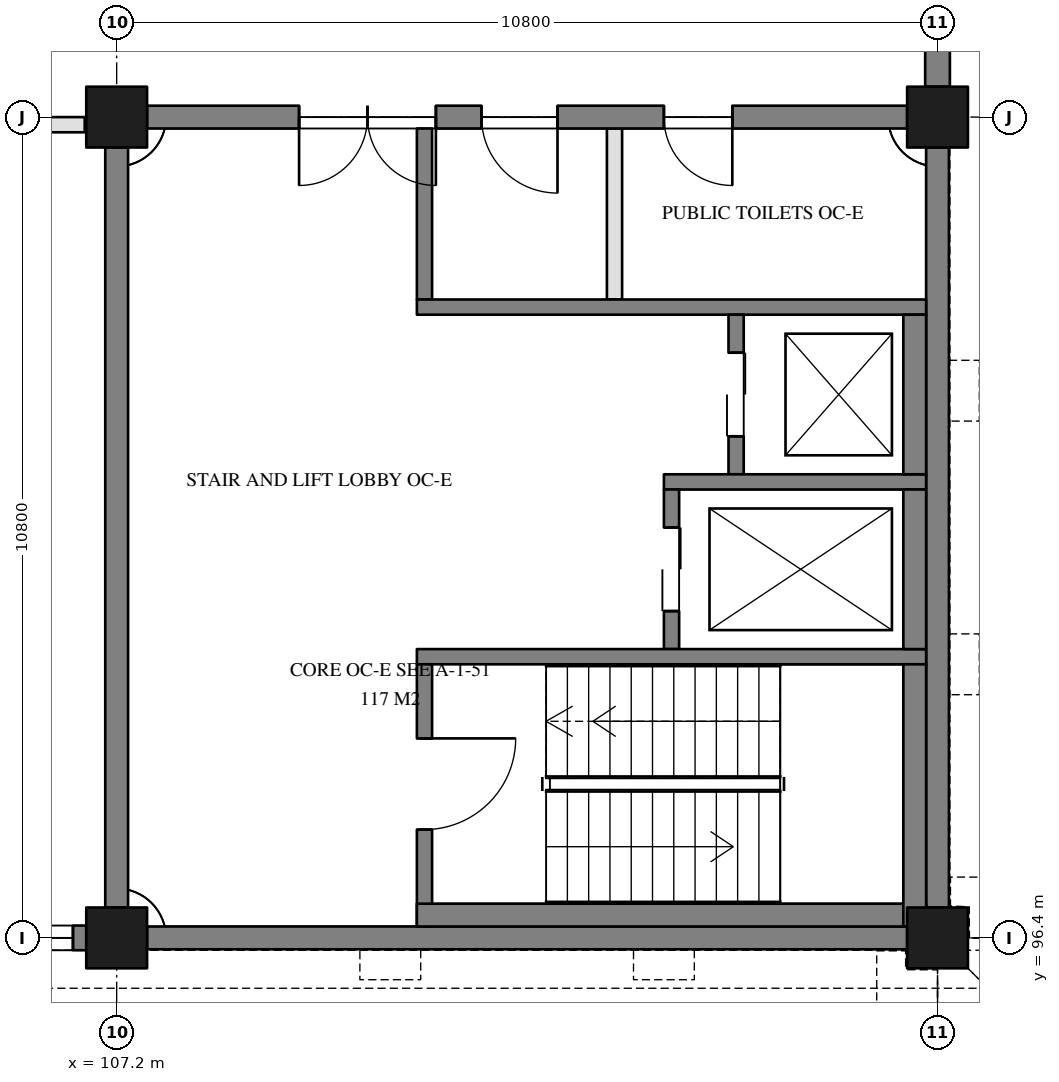
"""IFC4 building model, lengths in metres.
Left out: names, types, materials, properties, quantities, classifications, styles, units other than length and angle.
Written with IfcOpenShell. Run it as: python <this file> out.ifc"""

import sys

from ifc_helpers import new_model, si_unit, direction, frame, frame_2d, origin, origin_2d, place, context, subcontext, project, spatial, rectangle, extrude, element, fill, save


model = new_model("IFC4")
c1 = context("Model", 3, precision=1e-05, world=origin(), true_north=direction((0.0, 1.0)))
c2 = subcontext(c1, "Body", "Model", "MODEL_VIEW")
j1 = project(units=[si_unit("LENGTHUNIT", "METRE"), si_unit("PLANEANGLEUNIT", "RADIAN")], contexts=[c1])
p1 = place(None, origin())
s1 = spatial("IfcSite", under=j1, at=p1, CompositionType="ELEMENT")
p2 = place(p1, origin())
s2 = spatial("IfcBuilding", under=s1, at=p2, CompositionType="ELEMENT")
p3 = place(p2, frame((0.0, 0.0, 8.7)))
s3 = spatial("IfcBuildingStorey", under=s2, at=p3, CompositionType="ELEMENT", Elevation=8.7)
for number, where, z_axis, x_axis in (
    (1, (107.2, 96.4, 0.0), (0.0, 0.0, 1.0), (1.0, 0.0, 0.0)),
    (2, (107.2, 107.2, 0.0), (0.0, 0.0, 1.0), (1.0, 0.0, 0.0)),
    (3, (118.0, 96.4, 0.0), (0.0, 0.0, 1.0), (1.0, 0.0, 0.0)),
    (4, (118.0, 107.2, 0.0), (0.0, 0.0, 1.0), (1.0, 0.0, 0.0)),
):
    element("IfcColumn", number, at=place(p3, frame(where, z_axis=z_axis, x_axis=x_axis)), inside=s3, PredefinedType="COLUMN", context=c2, shape_type="SweptSolid", body=[
        extrude(rectangle(XDim=0.8, YDim=0.8, at=origin_2d()), origin(), (0.0, 0.0, 1.0), 3.9),
    ])
for number, where, z_axis, x_axis in (
    (5, (107.6, 96.4, 0.0), (0.0, 0.0, 1.0), (1.0, 0.0, 0.0)),
    (6, (118.0, 96.8, 0.0), (0.0, 0.0, 1.0), (0.0, 1.0, 0.0)),
):
    element("IfcWall", number, at=place(p3, frame(where, z_axis=z_axis, x_axis=x_axis)), inside=s3, PredefinedType="SOLIDWALL", context=c2, shape_type="SweptSolid", body=[
        extrude(rectangle(XDim=10.0, YDim=0.3, at=frame_2d((5.0, 0.0))), origin(), (0.0, 0.0, 1.0), 3.9),
    ])
p4 = place(p3, frame((117.6, 107.2, 0.0), z_axis=(0.0, 0.0, 1.0), x_axis=(-1.0, 0.0, 0.0)))
e7 = element("IfcWall", 7, at=p4, inside=s3, PredefinedType="SOLIDWALL", context=c2, shape_type="SweptSolid", body=[
    extrude(rectangle(XDim=10.0, YDim=0.3, at=frame_2d((5.0, 0.0))), origin(), (0.0, 0.0, 1.0), 3.9),
])
p5 = place(p4, frame((6.2, 0.0, 0.0)))
e8 = element("IfcOpeningElement", 8, at=p5, cuts=e7, PredefinedType="OPENING", context=c2, shape_type="SweptSolid", body=[
    extrude(rectangle(XDim=1.8, YDim=2.1, at=frame_2d((0.9, 1.05))), frame((0.0, 0.16, 0.0), z_axis=(0.0, -1.0, 0.0), x_axis=(1.0, 0.0, 0.0)), (0.0, 0.0, 1.0), 0.32),
])
p6 = place(p4, frame((4.6, 0.0, 0.0)))
e9 = element("IfcOpeningElement", 9, at=p6, cuts=e7, PredefinedType="OPENING", context=c2, shape_type="SweptSolid", body=[
    extrude(rectangle(XDim=1.0, YDim=2.1, at=frame_2d((0.5, 1.05))), frame((0.0, 0.16, 0.0), z_axis=(0.0, -1.0, 0.0), x_axis=(1.0, 0.0, 0.0)), (0.0, 0.0, 1.0), 0.32),
])
p7 = place(p4, frame((2.3, 0.0, 0.0)))
e10 = element("IfcOpeningElement", 10, at=p7, cuts=e7, PredefinedType="OPENING", context=c2, shape_type="SweptSolid", body=[
    extrude(rectangle(XDim=0.9, YDim=2.1, at=frame_2d((0.45, 1.05))), frame((0.0, 0.16, 0.0), z_axis=(0.0, -1.0, 0.0), x_axis=(1.0, 0.0, 0.0)), (0.0, 0.0, 1.0), 0.32),
])
p8 = place(p3, frame((107.2, 106.8, 0.0), z_axis=(0.0, 0.0, 1.0), x_axis=(0.0, -1.0, 0.0)))
e11 = element("IfcWall", 11, at=p8, inside=s3, PredefinedType="SOLIDWALL", context=c2, shape_type="SweptSolid", body=[
    extrude(rectangle(XDim=10.0, YDim=0.3, at=frame_2d((5.0, 0.0))), origin(), (0.0, 0.0, 1.0), 3.9),
])
p9 = place(p3, frame((96.8, 96.4, 0.0), z_axis=(0.0, 0.0, 1.0), x_axis=(1.0, 0.0, 0.0)))
e12 = element("IfcWall", 12, at=p9, inside=s3, PredefinedType="SOLIDWALL", context=c2, shape_type="SweptSolid", body=[
    extrude(rectangle(XDim=10.0, YDim=0.325, at=frame_2d((5.0, 0.0))), origin(), (0.0, 0.0, 1.0), 2.8),
])
p10 = place(p9, frame((0.175, 0.0, 0.5)))
e13 = element("IfcOpeningElement", 13, at=p10, cuts=e12, PredefinedType="OPENING", context=c2, shape_type="SweptSolid", body=[
    extrude(rectangle(XDim=0.95, YDim=2.25, at=frame_2d((0.475, 1.125))), frame((0.0, 0.172, 0.0), z_axis=(0.0, -1.0, 0.0), x_axis=(1.0, 0.0, 0.0)), (0.0, 0.0, 1.0), 0.345),
])
p11 = place(p9, frame((3.775, 0.0, 0.5)))
e14 = element("IfcOpeningElement", 14, at=p11, cuts=e12, PredefinedType="OPENING", context=c2, shape_type="SweptSolid", body=[
    extrude(rectangle(XDim=0.95, YDim=2.25, at=frame_2d((0.475, 1.125))), frame((0.0, 0.172, 0.0), z_axis=(0.0, -1.0, 0.0), x_axis=(1.0, 0.0, 0.0)), (0.0, 0.0, 1.0), 0.345),
])
p12 = place(p9, frame((7.375, 0.0, 0.5)))
e15 = element("IfcOpeningElement", 15, at=p12, cuts=e12, PredefinedType="OPENING", context=c2, shape_type="SweptSolid", body=[
    extrude(rectangle(XDim=0.95, YDim=2.25, at=frame_2d((0.475, 1.125))), frame((0.0, 0.172, 0.0), z_axis=(0.0, -1.0, 0.0), x_axis=(1.0, 0.0, 0.0)), (0.0, 0.0, 1.0), 0.345),
])
p13 = place(p9, frame((1.675, 0.0, 0.5)))
e16 = element("IfcOpeningElement", 16, at=p13, cuts=e12, PredefinedType="OPENING", context=c2, shape_type="SweptSolid", body=[
    extrude(rectangle(XDim=0.95, YDim=2.25, at=frame_2d((0.475, 1.125))), frame((0.0, 0.172, 0.0), z_axis=(0.0, -1.0, 0.0), x_axis=(1.0, 0.0, 0.0)), (0.0, 0.0, 1.0), 0.345),
])
p14 = place(p9, frame((5.275, 0.0, 0.5)))
e17 = element("IfcOpeningElement", 17, at=p14, cuts=e12, PredefinedType="OPENING", context=c2, shape_type="SweptSolid", body=[
    extrude(rectangle(XDim=0.95, YDim=2.25, at=frame_2d((0.475, 1.125))), frame((0.0, 0.172, 0.0), z_axis=(0.0, -1.0, 0.0), x_axis=(1.0, 0.0, 0.0)), (0.0, 0.0, 1.0), 0.345),
])
p15 = place(p9, frame((8.875, 0.0, 0.5)))
e18 = element("IfcOpeningElement", 18, at=p15, cuts=e12, PredefinedType="OPENING", context=c2, shape_type="SweptSolid", body=[
    extrude(rectangle(XDim=0.95, YDim=2.25, at=frame_2d((0.475, 1.125))), frame((0.0, 0.172, 0.0), z_axis=(0.0, -1.0, 0.0), x_axis=(1.0, 0.0, 0.0)), (0.0, 0.0, 1.0), 0.345),
])
p16 = place(p3, frame((118.0, 107.6, 0.0), z_axis=(0.0, 0.0, 1.0), x_axis=(0.0, 1.0, 0.0)))
e19 = element("IfcWall", 19, at=p16, inside=s3, PredefinedType="SOLIDWALL", context=c2, shape_type="SweptSolid", body=[
    extrude(rectangle(XDim=3.8, YDim=0.325, at=frame_2d((1.9, 0.0))), origin(), (0.0, 0.0, 1.0), 2.8),
])
p17 = place(p16, frame((0.95, 0.0, 0.7)))
e20 = element("IfcOpeningElement", 20, at=p17, cuts=e19, PredefinedType="OPENING", context=c2, shape_type="SweptSolid", body=[
    extrude(rectangle(XDim=0.9, YDim=2.0, at=frame_2d((0.45, 1.0))), frame((0.0, 0.172, 0.0), z_axis=(0.0, -1.0, 0.0), x_axis=(1.0, 0.0, 0.0)), (0.0, 0.0, 1.0), 0.345),
])
p18 = place(p3, frame((111.25, 107.05, 0.0), z_axis=(0.0, 0.0, 1.0), x_axis=(0.0, -1.0, 0.0)))
e21 = element("IfcWall", 21, at=p18, inside=s3, PredefinedType="SOLIDWALL", context=c2, shape_type="SweptSolid", body=[
    extrude(rectangle(XDim=2.25, YDim=0.2, at=frame_2d((1.125, 0.0))), origin(), (0.0, 0.0, 1.0), 3.6),
])
p19 = place(p3, frame((111.15, 104.7, 0.0), z_axis=(0.0, 0.0, 1.0), x_axis=(1.0, 0.0, 0.0)))
e22 = element("IfcWall", 22, at=p19, inside=s3, PredefinedType="SOLIDWALL", context=c2, shape_type="SweptSolid", body=[
    extrude(rectangle(XDim=6.7, YDim=0.2, at=frame_2d((3.35, 0.0))), origin(), (0.0, 0.0, 1.0), 3.6),
])
p20 = place(p3, frame((115.35, 104.6, 0.0), z_axis=(0.0, 0.0, 1.0), x_axis=(0.0, -1.0, 0.0)))
e23 = element("IfcWall", 23, at=p20, inside=s3, PredefinedType="SOLIDWALL", context=c2, shape_type="SweptSolid", body=[
    extrude(rectangle(XDim=2.1, YDim=0.2, at=frame_2d((1.05, 0.0))), origin(), (0.0, 0.0, 1.0), 3.6),
])
p21 = place(p20, frame((0.5, 0.0, 0.0)))
e24 = element("IfcOpeningElement", 24, at=p21, cuts=e23, PredefinedType="OPENING", context=c2, shape_type="SweptSolid", body=[
    extrude(rectangle(XDim=1.1, YDim=2.1, at=frame_2d((0.55, 1.05))), frame((0.0, 0.11, 0.0), z_axis=(0.0, -1.0, 0.0), x_axis=(1.0, 0.0, 0.0)), (0.0, 0.0, 1.0), 0.22),
])
p22 = place(p3, frame((114.4, 102.4, 0.0), z_axis=(0.0, 0.0, 1.0), x_axis=(1.0, 0.0, 0.0)))
e25 = element("IfcWall", 25, at=p22, inside=s3, PredefinedType="SOLIDWALL", context=c2, shape_type="SweptSolid", body=[
    extrude(rectangle(XDim=3.45, YDim=0.2, at=frame_2d((1.725, 0.0))), origin(), (0.0, 0.0, 1.0), 3.6),
])
p23 = place(p3, frame((114.5, 102.3, 0.0), z_axis=(0.0, 0.0, 1.0), x_axis=(0.0, -1.0, 0.0)))
e26 = element("IfcWall", 26, at=p23, inside=s3, PredefinedType="SOLIDWALL", context=c2, shape_type="SweptSolid", body=[
    extrude(rectangle(XDim=2.1, YDim=0.2, at=frame_2d((1.05, 0.0))), origin(), (0.0, 0.0, 1.0), 3.6),
])
p24 = place(p23, frame((0.5, 0.0, 0.0)))
e27 = element("IfcOpeningElement", 27, at=p24, cuts=e26, PredefinedType="OPENING", context=c2, shape_type="SweptSolid", body=[
    extrude(rectangle(XDim=1.1, YDim=2.1, at=frame_2d((0.55, 1.05))), frame((0.0, 0.11, 0.0), z_axis=(0.0, -1.0, 0.0), x_axis=(1.0, 0.0, 0.0)), (0.0, 0.0, 1.0), 0.22),
])
p25 = place(p3, frame((111.15, 100.1, 0.0), z_axis=(0.0, 0.0, 1.0), x_axis=(1.0, 0.0, 0.0)))
e28 = element("IfcWall", 28, at=p25, inside=s3, PredefinedType="SOLIDWALL", context=c2, shape_type="SweptSolid", body=[
    extrude(rectangle(XDim=6.7, YDim=0.2, at=frame_2d((3.35, 0.0))), origin(), (0.0, 0.0, 1.0), 3.6),
])
p26 = place(p3, frame((111.25, 100.0, 0.0), z_axis=(0.0, 0.0, 1.0), x_axis=(0.0, -1.0, 0.0)))
e29 = element("IfcWall", 29, at=p26, inside=s3, PredefinedType="SOLIDWALL", context=c2, shape_type="SweptSolid", body=[
    extrude(rectangle(XDim=3.45, YDim=0.2, at=frame_2d((1.725, 0.0))), origin(), (0.0, 0.0, 1.0), 3.6),
])
p27 = place(p26, frame((0.975, 0.0, 0.0)))
e30 = element("IfcOpeningElement", 30, at=p27, cuts=e29, PredefinedType="OPENING", context=c2, shape_type="SweptSolid", body=[
    extrude(rectangle(XDim=1.2, YDim=2.1, at=frame_2d((0.6, 1.05))), frame((0.0, 0.11, 0.0), z_axis=(0.0, -1.0, 0.0), x_axis=(1.0, 0.0, 0.0)), (0.0, 0.0, 1.0), 0.22),
])
p28 = place(p3, frame((111.15, 96.7, -0.3), z_axis=(0.0, 0.0, 1.0), x_axis=(1.0, 0.0, 0.0)))
e31 = element("IfcWall", 31, at=p28, inside=s3, PredefinedType="SOLIDWALL", context=c2, shape_type="SweptSolid", body=[
    extrude(rectangle(XDim=6.7, YDim=0.3, at=frame_2d((3.35, 0.0))), origin(), (0.0, 0.0, 1.0), 3.9),
])
p29 = place(p3, frame((117.7, 100.0, -0.3), z_axis=(0.0, 0.0, 1.0), x_axis=(0.0, -1.0, 0.0)))
e32 = element("IfcWall", 32, at=p29, inside=s3, PredefinedType="SOLIDWALL", context=c2, shape_type="SweptSolid", body=[
    extrude(rectangle(XDim=3.45, YDim=0.3, at=frame_2d((1.725, 0.0))), origin(), (0.0, 0.0, 1.0), 3.9),
])
for number, where, z_axis, x_axis in (
    (33, (117.7, 104.6, -0.3), (0.0, 0.0, 1.0), (0.0, -1.0, 0.0)),
    (34, (117.7, 102.3, -0.3), (0.0, 0.0, 1.0), (0.0, -1.0, 0.0)),
):
    element("IfcWall", number, at=place(p3, frame(where, z_axis=z_axis, x_axis=x_axis)), inside=s3, PredefinedType="SOLIDWALL", context=c2, shape_type="SweptSolid", body=[
        extrude(rectangle(XDim=2.1, YDim=0.3, at=frame_2d((1.05, 0.0))), origin(), (0.0, 0.0, 1.0), 3.9),
    ])
p30 = place(p3, frame((113.75, 107.05, 0.0), z_axis=(0.0, 0.0, 1.0), x_axis=(0.0, -1.0, 0.0)))
e35 = element("IfcWall", 35, at=p30, inside=s3, PredefinedType="PARTITIONING", context=c2, shape_type="SweptSolid", body=[
    extrude(rectangle(XDim=2.25, YDim=0.2, at=frame_2d((1.125, 0.0))), origin(), (0.0, 0.0, 1.0), 3.6),
])
p31 = place(p3, frame((96.82, 107.1, 0.0), z_axis=(0.0, 0.0, 1.0), x_axis=(1.0, 0.0, 0.0)))
e36 = element("IfcWall", 36, at=p31, inside=s3, PredefinedType="PARTITIONING", context=c2, shape_type="SweptSolid", body=[
    extrude(rectangle(XDim=9.96, YDim=0.2, at=frame_2d((4.98, 0.0))), origin(), (0.0, 0.0, 1.0), 2.8),
])
p32 = place(p31, frame((4.08, 0.0, 0.0)))
e37 = element("IfcOpeningElement", 37, at=p32, cuts=e36, PredefinedType="OPENING", context=c2, shape_type="SweptSolid", body=[
    extrude(rectangle(XDim=1.8, YDim=2.1, at=frame_2d((0.9, 1.05))), frame((0.0, 0.11, 0.0), z_axis=(0.0, -1.0, 0.0), x_axis=(1.0, 0.0, 0.0)), (0.0, 0.0, 1.0), 0.22),
])
p33 = place(p15, origin())
e38 = element("IfcWindow", 38, at=p33, inside=s3, PartitioningType="SINGLE_PANEL", PredefinedType="WINDOW", context=c2, shape_type="SweptSolid", body=[
    extrude(rectangle(XDim=0.95, YDim=2.25, at=frame_2d((0.475, 1.125))), frame((0.0, 0.03, 0.0), z_axis=(0.0, -1.0, 0.0), x_axis=(1.0, 0.0, 0.0)), (0.0, 0.0, 1.0), 0.06),
])
fill(e18, e38)
p34 = place(p21, frame((1.1, 0.0, 0.0), z_axis=(0.0, 0.0, 1.0), x_axis=(-1.0, 0.0, 0.0)))
e39 = element("IfcDoor", 39, at=p34, inside=s3, OperationType="DOUBLE_DOOR_SLIDING", PredefinedType="DOOR", context=c2, shape_type="SweptSolid", body=[
    extrude(rectangle(XDim=1.1, YDim=2.1, at=frame_2d((0.55, 1.05))), frame((0.0, 0.025, 0.0), z_axis=(0.0, -1.0, 0.0), x_axis=(1.0, 0.0, 0.0)), (0.0, 0.0, 1.0), 0.05),
])
fill(e24, e39)
p35 = place(p24, frame((1.1, 0.0, 0.0), z_axis=(0.0, 0.0, 1.0), x_axis=(-1.0, 0.0, 0.0)))
e40 = element("IfcDoor", 40, at=p35, inside=s3, OperationType="DOUBLE_DOOR_SLIDING", PredefinedType="DOOR", context=c2, shape_type="SweptSolid", body=[
    extrude(rectangle(XDim=1.1, YDim=2.1, at=frame_2d((0.55, 1.05))), frame((0.0, 0.025, 0.0), z_axis=(0.0, -1.0, 0.0), x_axis=(1.0, 0.0, 0.0)), (0.0, 0.0, 1.0), 0.05),
])
fill(e27, e40)
p36 = place(p27, frame((1.2, 0.0, 0.0), z_axis=(0.0, 0.0, 1.0), x_axis=(-1.0, 0.0, 0.0)))
e41 = element("IfcDoor", 41, at=p36, inside=s3, OperationType="SINGLE_SWING_RIGHT", PredefinedType="DOOR", context=c2, shape_type="SweptSolid", body=[
    extrude(rectangle(XDim=1.2, YDim=2.1, at=frame_2d((0.6, 1.05))), frame((0.0, 0.025, 0.0), z_axis=(0.0, -1.0, 0.0), x_axis=(1.0, 0.0, 0.0)), (0.0, 0.0, 1.0), 0.05),
])
fill(e30, e41)
p37 = place(p5, frame((1.8, 0.0, 0.0), z_axis=(0.0, 0.0, 1.0), x_axis=(-1.0, 0.0, 0.0)))
e42 = element("IfcDoor", 42, at=p37, inside=s3, OperationType="DOUBLE_DOOR_DOUBLE_SWING", PredefinedType="DOOR", context=c2, shape_type="SweptSolid", body=[
    extrude(rectangle(XDim=1.8, YDim=2.1, at=frame_2d((0.9, 1.05))), frame((0.0, 0.025, 0.0), z_axis=(0.0, -1.0, 0.0), x_axis=(1.0, 0.0, 0.0)), (0.0, 0.0, 1.0), 0.05),
])
fill(e8, e42)
p38 = place(p6, origin())
e43 = element("IfcDoor", 43, at=p38, inside=s3, OperationType="SINGLE_SWING_RIGHT", PredefinedType="DOOR", context=c2, shape_type="SweptSolid", body=[
    extrude(rectangle(XDim=1.0, YDim=2.1, at=frame_2d((0.5, 1.05))), frame((0.0, 0.025, 0.0), z_axis=(0.0, -1.0, 0.0), x_axis=(1.0, 0.0, 0.0)), (0.0, 0.0, 1.0), 0.05),
])
fill(e9, e43)
p39 = place(p7, origin())
e44 = element("IfcDoor", 44, at=p39, inside=s3, OperationType="SINGLE_SWING_LEFT", PredefinedType="DOOR", context=c2, shape_type="SweptSolid", body=[
    extrude(rectangle(XDim=0.9, YDim=2.1, at=frame_2d((0.45, 1.05))), frame((0.0, 0.025, 0.0), z_axis=(0.0, -1.0, 0.0), x_axis=(1.0, 0.0, 0.0)), (0.0, 0.0, 1.0), 0.05),
])
fill(e10, e44)
save(model, sys.argv[1])
